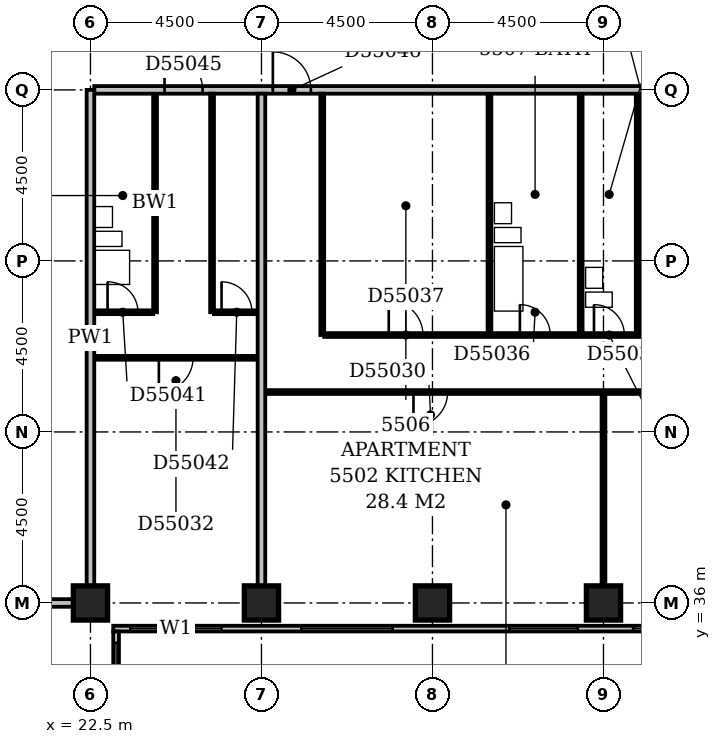
"""IFC4 building model, lengths in metres.
Left out: names, types, materials, properties, quantities, classifications, styles, units other than length and angle.
Written with IfcOpenShell. Run it as: python <this file> out.ifc"""

import sys

from ifc_helpers import new_model, si_unit, direction, frame, frame_2d, origin, origin_2d, place, context, subcontext, project, spatial, rectangle, extrude, element, fill, save


model = new_model("IFC4")
c1 = context("Model", 3, precision=1e-05, world=origin(), true_north=direction((0.0, 1.0)))
c2 = subcontext(c1, "Body", "Model", "MODEL_VIEW")
j1 = project(units=[si_unit("LENGTHUNIT", "METRE"), si_unit("PLANEANGLEUNIT", "RADIAN")], contexts=[c1])
p1 = place(None, origin())
s1 = spatial("IfcSite", under=j1, at=p1, CompositionType="ELEMENT")
p2 = place(p1, origin())
s2 = spatial("IfcBuilding", under=s1, at=p2, CompositionType="ELEMENT")
p3 = place(p2, frame((0.0, 0.0, 215.0)))
s3 = spatial("IfcBuildingStorey", under=s2, at=p3, CompositionType="ELEMENT", Elevation=215.0)
for number, where, z_axis, x_axis in (
    (1, (22.5, 36.0, -0.3), (0.0, 0.0, 1.0), (1.0, 0.0, 0.0)),
    (2, (27.0, 36.0, -0.3), (0.0, 0.0, 1.0), (1.0, 0.0, 0.0)),
    (3, (31.5, 36.0, -0.3), (0.0, 0.0, 1.0), (1.0, 0.0, 0.0)),
    (4, (36.0, 36.0, -0.3), (0.0, 0.0, 1.0), (1.0, 0.0, 0.0)),
):
    element("IfcColumn", number, at=place(p3, frame(where, z_axis=z_axis, x_axis=x_axis)), inside=s3, PredefinedType="COLUMN", context=c2, shape_type="SweptSolid", body=[
        extrude(rectangle(XDim=0.9, YDim=0.9, at=origin_2d()), origin(), (0.0, 0.0, 1.0), 3.6),
    ])
p4 = place(p3, frame((23.175, 17.4, 0.0), z_axis=(0.0, 0.0, 1.0), x_axis=(0.0, 1.0, 0.0)))
e5 = element("IfcWall", 5, at=p4, inside=s3, PredefinedType="STANDARD", context=c2, shape_type="SweptSolid", body=[
    extrude(rectangle(XDim=17.85, YDim=0.15, at=frame_2d((8.925, 0.0))), origin(), (0.0, 0.0, 1.0), 2.7),
])
p5 = place(p4, frame((1.65, 0.0, 0.6)))
e6 = element("IfcOpeningElement", 6, at=p5, cuts=e5, PredefinedType="OPENING", context=c2, shape_type="SweptSolid", body=[
    extrude(rectangle(XDim=2.4, YDim=1.8, at=frame_2d((1.2, 0.9))), frame((0.0, 0.087, 0.0), z_axis=(0.0, -1.0, 0.0), x_axis=(1.0, 0.0, 0.0)), (0.0, 0.0, 1.0), 0.174),
])
p6 = place(p4, frame((6.15, 0.0, 0.6)))
e7 = element("IfcOpeningElement", 7, at=p6, cuts=e5, PredefinedType="OPENING", context=c2, shape_type="SweptSolid", body=[
    extrude(rectangle(XDim=2.4, YDim=1.8, at=frame_2d((1.2, 0.9))), frame((0.0, 0.087, 0.0), z_axis=(0.0, -1.0, 0.0), x_axis=(1.0, 0.0, 0.0)), (0.0, 0.0, 1.0), 0.174),
])
p7 = place(p4, frame((10.288, 0.0, 0.6)))
e8 = element("IfcOpeningElement", 8, at=p7, cuts=e5, PredefinedType="OPENING", context=c2, shape_type="SweptSolid", body=[
    extrude(rectangle(XDim=1.8, YDim=1.8, at=frame_2d((0.9, 0.9))), frame((0.0, 0.087, 0.0), z_axis=(0.0, -1.0, 0.0), x_axis=(1.0, 0.0, 0.0)), (0.0, 0.0, 1.0), 0.174),
])
p8 = place(p4, frame((15.15, 0.0, 0.6)))
e9 = element("IfcOpeningElement", 9, at=p8, cuts=e5, PredefinedType="OPENING", context=c2, shape_type="SweptSolid", body=[
    extrude(rectangle(XDim=2.4, YDim=1.8, at=frame_2d((1.2, 0.9))), frame((0.0, 0.087, 0.0), z_axis=(0.0, -1.0, 0.0), x_axis=(1.0, 0.0, 0.0)), (0.0, 0.0, 1.0), 0.174),
])
p9 = place(p3, frame((23.1, 35.325, 0.0), z_axis=(0.0, 0.0, 1.0), x_axis=(1.0, 0.0, 0.0)))
e10 = element("IfcWall", 10, at=p9, inside=s3, PredefinedType="STANDARD", context=c2, shape_type="SweptSolid", body=[
    extrude(rectangle(XDim=27.15, YDim=0.15, at=frame_2d((13.575, 0.0))), origin(), (0.0, 0.0, 1.0), 2.7),
])
p10 = place(p9, frame((0.45, 0.0, 0.6)))
e11 = element("IfcOpeningElement", 11, at=p10, cuts=e10, PredefinedType="OPENING", context=c2, shape_type="SweptSolid", body=[
    extrude(rectangle(XDim=2.4, YDim=1.8, at=frame_2d((1.2, 0.9))), frame((0.0, 0.087, 0.0), z_axis=(0.0, -1.0, 0.0), x_axis=(1.0, 0.0, 0.0)), (0.0, 0.0, 1.0), 0.174),
])
p11 = place(p9, frame((4.95, 0.0, 0.6)))
e12 = element("IfcOpeningElement", 12, at=p11, cuts=e10, PredefinedType="OPENING", context=c2, shape_type="SweptSolid", body=[
    extrude(rectangle(XDim=2.4, YDim=1.8, at=frame_2d((1.2, 0.9))), frame((0.0, 0.087, 0.0), z_axis=(0.0, -1.0, 0.0), x_axis=(1.0, 0.0, 0.0)), (0.0, 0.0, 1.0), 0.174),
])
p12 = place(p9, frame((10.424, 0.0, 0.6)))
e13 = element("IfcOpeningElement", 13, at=p12, cuts=e10, PredefinedType="OPENING", context=c2, shape_type="SweptSolid", body=[
    extrude(rectangle(XDim=1.8, YDim=1.8, at=frame_2d((0.9, 0.9))), frame((0.0, 0.087, 0.0), z_axis=(0.0, -1.0, 0.0), x_axis=(1.0, 0.0, 0.0)), (0.0, 0.0, 1.0), 0.174),
])
p13 = place(p9, frame((13.68, 0.0, 0.6)))
e14 = element("IfcOpeningElement", 14, at=p13, cuts=e10, PredefinedType="OPENING", context=c2, shape_type="SweptSolid", body=[
    extrude(rectangle(XDim=1.8, YDim=1.8, at=frame_2d((0.9, 0.9))), frame((0.0, 0.087, 0.0), z_axis=(0.0, -1.0, 0.0), x_axis=(1.0, 0.0, 0.0)), (0.0, 0.0, 1.0), 0.174),
])
p14 = place(p9, frame((18.45, 0.0, 0.6)))
e15 = element("IfcOpeningElement", 15, at=p14, cuts=e10, PredefinedType="OPENING", context=c2, shape_type="SweptSolid", body=[
    extrude(rectangle(XDim=2.4, YDim=1.8, at=frame_2d((1.2, 0.9))), frame((0.0, 0.087, 0.0), z_axis=(0.0, -1.0, 0.0), x_axis=(1.0, 0.0, 0.0)), (0.0, 0.0, 1.0), 0.174),
])
p15 = place(p9, frame((22.95, 0.0, 0.6)))
e16 = element("IfcOpeningElement", 16, at=p15, cuts=e10, PredefinedType="OPENING", context=c2, shape_type="SweptSolid", body=[
    extrude(rectangle(XDim=2.4, YDim=1.8, at=frame_2d((1.2, 0.9))), frame((0.0, 0.087, 0.0), z_axis=(0.0, -1.0, 0.0), x_axis=(1.0, 0.0, 0.0)), (0.0, 0.0, 1.0), 0.174),
])
p16 = place(p3, frame((9.1, 36.0, 0.0), z_axis=(0.0, 0.0, 1.0), x_axis=(1.0, 0.0, 0.0)))
e17 = element("IfcWall", 17, at=p16, inside=s3, PredefinedType="PARTITIONING", context=c2, shape_type="SweptSolid", body=[
    extrude(rectangle(XDim=12.95, YDim=0.2, at=frame_2d((6.475, 0.0))), origin(), (0.0, 0.0, 1.0), 3.3),
])
p17 = place(p3, frame((22.5, 36.45, 0.0), z_axis=(0.0, 0.0, 1.0), x_axis=(0.0, 1.0, 0.0)))
e18 = element("IfcWall", 18, at=p17, inside=s3, PredefinedType="PARTITIONING", context=c2, shape_type="SweptSolid", body=[
    extrude(rectangle(XDim=13.05, YDim=0.2, at=frame_2d((6.525, 0.0))), origin(), (0.0, 0.0, 1.0), 3.3),
])
p18 = place(p3, frame((27.0, 36.45, 0.0), z_axis=(0.0, 0.0, 1.0), x_axis=(0.0, 1.0, 0.0)))
e19 = element("IfcWall", 19, at=p18, inside=s3, PredefinedType="PARTITIONING", context=c2, shape_type="SweptSolid", body=[
    extrude(rectangle(XDim=12.95, YDim=0.2, at=frame_2d((6.475, 0.0))), origin(), (0.0, 0.0, 1.0), 2.4),
])
p19 = place(p3, frame((36.0, 36.45, 0.0), z_axis=(0.0, 0.0, 1.0), x_axis=(0.0, 1.0, 0.0)))
e20 = element("IfcWall", 20, at=p19, inside=s3, PredefinedType="PARTITIONING", context=c2, shape_type="SweptSolid", body=[
    extrude(rectangle(XDim=5.05, YDim=0.1, at=frame_2d((2.525, 0.0))), origin(), (0.0, 0.0, 1.0), 2.4),
])
p20 = place(p3, frame((27.1, 41.55, 0.0), z_axis=(0.0, 0.0, 1.0), x_axis=(1.0, 0.0, 0.0)))
e21 = element("IfcWall", 21, at=p20, inside=s3, PredefinedType="PARTITIONING", context=c2, shape_type="SweptSolid", body=[
    extrude(rectangle(XDim=13.3, YDim=0.1, at=frame_2d((6.65, 0.0))), origin(), (0.0, 0.0, 1.0), 3.3),
])
p21 = place(p20, frame((3.9, 0.0, 0.0)))
e22 = element("IfcOpeningElement", 22, at=p21, cuts=e21, PredefinedType="OPENING", context=c2, shape_type="SweptSolid", body=[
    extrude(rectangle(XDim=0.9, YDim=2.1, at=frame_2d((0.45, 1.05))), frame((0.0, 0.062, 0.0), z_axis=(0.0, -1.0, 0.0), x_axis=(1.0, 0.0, 0.0)), (0.0, 0.0, 1.0), 0.124),
])
p22 = place(p20, frame((10.7, 0.0, 0.0)))
e23 = element("IfcOpeningElement", 23, at=p22, cuts=e21, PredefinedType="OPENING", context=c2, shape_type="SweptSolid", body=[
    extrude(rectangle(XDim=0.9, YDim=2.1, at=frame_2d((0.45, 1.05))), frame((0.0, 0.062, 0.0), z_axis=(0.0, -1.0, 0.0), x_axis=(1.0, 0.0, 0.0)), (0.0, 0.0, 1.0), 0.124),
])
p23 = place(p3, frame((22.6, 42.45, 0.0), z_axis=(0.0, 0.0, 1.0), x_axis=(1.0, 0.0, 0.0)))
e24 = element("IfcWall", 24, at=p23, inside=s3, PredefinedType="PARTITIONING", context=c2, shape_type="SweptSolid", body=[
    extrude(rectangle(XDim=4.3, YDim=0.1, at=frame_2d((2.15, 0.0))), origin(), (0.0, 0.0, 1.0), 3.3),
])
p24 = place(p23, frame((1.7, 0.0, 0.0)))
e25 = element("IfcOpeningElement", 25, at=p24, cuts=e24, PredefinedType="OPENING", context=c2, shape_type="SweptSolid", body=[
    extrude(rectangle(XDim=0.9, YDim=2.1, at=frame_2d((0.45, 1.05))), frame((0.0, 0.062, 0.0), z_axis=(0.0, -1.0, 0.0), x_axis=(1.0, 0.0, 0.0)), (0.0, 0.0, 1.0), 0.124),
])
p25 = place(p3, frame((28.6, 43.05, 0.0), z_axis=(0.0, 0.0, 1.0), x_axis=(0.0, 1.0, 0.0)))
e26 = element("IfcWall", 26, at=p25, inside=s3, PredefinedType="PARTITIONING", context=c2, shape_type="SweptSolid", body=[
    extrude(rectangle(XDim=6.35, YDim=0.1, at=frame_2d((3.175, 0.0))), origin(), (0.0, 0.0, 1.0), 3.3),
])
p26 = place(p3, frame((28.65, 43.05, 0.0), z_axis=(0.0, 0.0, 1.0), x_axis=(1.0, 0.0, 0.0)))
e27 = element("IfcWall", 27, at=p26, inside=s3, PredefinedType="PARTITIONING", context=c2, shape_type="SweptSolid", body=[
    extrude(rectangle(XDim=11.75, YDim=0.1, at=frame_2d((5.875, 0.0))), origin(), (0.0, 0.0, 1.0), 3.3),
])
p27 = place(p26, frame((5.15, 0.0, 0.0)))
e28 = element("IfcOpeningElement", 28, at=p27, cuts=e27, PredefinedType="OPENING", context=c2, shape_type="SweptSolid", body=[
    extrude(rectangle(XDim=0.8, YDim=2.1, at=frame_2d((0.4, 1.05))), frame((0.0, 0.062, 0.0), z_axis=(0.0, -1.0, 0.0), x_axis=(1.0, 0.0, 0.0)), (0.0, 0.0, 1.0), 0.124),
])
p28 = place(p26, frame((1.7, 0.0, 0.0)))
e29 = element("IfcOpeningElement", 29, at=p28, cuts=e27, PredefinedType="OPENING", context=c2, shape_type="SweptSolid", body=[
    extrude(rectangle(XDim=0.9, YDim=2.1, at=frame_2d((0.45, 1.05))), frame((0.0, 0.062, 0.0), z_axis=(0.0, -1.0, 0.0), x_axis=(1.0, 0.0, 0.0)), (0.0, 0.0, 1.0), 0.124),
])
p29 = place(p26, frame((8.65, 0.0, 0.0)))
e30 = element("IfcOpeningElement", 30, at=p29, cuts=e27, PredefinedType="OPENING", context=c2, shape_type="SweptSolid", body=[
    extrude(rectangle(XDim=0.8, YDim=2.1, at=frame_2d((0.4, 1.05))), frame((0.0, 0.062, 0.0), z_axis=(0.0, -1.0, 0.0), x_axis=(1.0, 0.0, 0.0)), (0.0, 0.0, 1.0), 0.124),
])
p30 = place(p26, frame((10.45, 0.0, 0.0)))
e31 = element("IfcOpeningElement", 31, at=p30, cuts=e27, PredefinedType="OPENING", context=c2, shape_type="SweptSolid", body=[
    extrude(rectangle(XDim=0.8, YDim=2.1, at=frame_2d((0.4, 1.05))), frame((0.0, 0.062, 0.0), z_axis=(0.0, -1.0, 0.0), x_axis=(1.0, 0.0, 0.0)), (0.0, 0.0, 1.0), 0.124),
])
p31 = place(p26, frame((7.1, 0.0, 0.0)))
e32 = element("IfcOpeningElement", 32, at=p31, cuts=e27, PredefinedType="OPENING", context=c2, shape_type="SweptSolid", body=[
    extrude(rectangle(XDim=0.8, YDim=2.1, at=frame_2d((0.4, 1.05))), frame((0.0, 0.062, 0.0), z_axis=(0.0, -1.0, 0.0), x_axis=(1.0, 0.0, 0.0)), (0.0, 0.0, 1.0), 0.124),
])
p32 = place(p3, frame((33.0, 43.1, 0.0), z_axis=(0.0, 0.0, 1.0), x_axis=(0.0, 1.0, 0.0)))
e33 = element("IfcWall", 33, at=p32, inside=s3, PredefinedType="PLUMBINGWALL", context=c2, shape_type="SweptSolid", body=[
    extrude(rectangle(XDim=6.3, YDim=0.1, at=frame_2d((3.15, 0.0))), origin(), (0.0, 0.0, 1.0), 3.3),
])
p33 = place(p3, frame((35.4, 43.1, 0.0), z_axis=(0.0, 0.0, 1.0), x_axis=(0.0, 1.0, 0.0)))
e34 = element("IfcWall", 34, at=p33, inside=s3, PredefinedType="PLUMBINGWALL", context=c2, shape_type="SweptSolid", body=[
    extrude(rectangle(XDim=6.3, YDim=0.1, at=frame_2d((3.15, 0.0))), origin(), (0.0, 0.0, 1.0), 2.4),
])
p34 = place(p3, frame((36.9, 43.1, 0.0), z_axis=(0.0, 0.0, 1.0), x_axis=(0.0, 1.0, 0.0)))
e35 = element("IfcWall", 35, at=p34, inside=s3, PredefinedType="PLUMBINGWALL", context=c2, shape_type="SweptSolid", body=[
    extrude(rectangle(XDim=6.3, YDim=0.1, at=frame_2d((3.15, 0.0))), origin(), (0.0, 0.0, 1.0), 3.3),
])
p35 = place(p3, frame((22.6, 43.65, 0.0), z_axis=(0.0, 0.0, 1.0), x_axis=(1.0, 0.0, 0.0)))
e36 = element("IfcWall", 36, at=p35, inside=s3, PredefinedType="PARTITIONING", context=c2, shape_type="SweptSolid", body=[
    extrude(rectangle(XDim=1.55, YDim=0.1, at=frame_2d((0.775, 0.0))), origin(), (0.0, 0.0, 1.0), 3.3),
])
p36 = place(p35, frame((0.35, 0.0, 0.0)))
e37 = element("IfcOpeningElement", 37, at=p36, cuts=e36, PredefinedType="OPENING", context=c2, shape_type="SweptSolid", body=[
    extrude(rectangle(XDim=0.8, YDim=2.1, at=frame_2d((0.4, 1.05))), frame((0.0, 0.062, 0.0), z_axis=(0.0, -1.0, 0.0), x_axis=(1.0, 0.0, 0.0)), (0.0, 0.0, 1.0), 0.124),
])
p37 = place(p3, frame((24.2, 43.65, 0.0), z_axis=(0.0, 0.0, 1.0), x_axis=(0.0, 1.0, 0.0)))
e38 = element("IfcWall", 38, at=p37, inside=s3, PredefinedType="PLUMBINGWALL", context=c2, shape_type="SweptSolid", body=[
    extrude(rectangle(XDim=5.75, YDim=0.1, at=frame_2d((2.875, 0.0))), origin(), (0.0, 0.0, 1.0), 3.3),
])
p38 = place(p3, frame((25.7, 43.65, 0.0), z_axis=(0.0, 0.0, 1.0), x_axis=(0.0, 1.0, 0.0)))
e39 = element("IfcWall", 39, at=p38, inside=s3, PredefinedType="PARTITIONING", context=c2, shape_type="SweptSolid", body=[
    extrude(rectangle(XDim=5.75, YDim=0.1, at=frame_2d((2.875, 0.0))), origin(), (0.0, 0.0, 1.0), 3.3),
])
p39 = place(p3, frame((25.75, 43.65, 0.0), z_axis=(0.0, 0.0, 1.0), x_axis=(1.0, 0.0, 0.0)))
e40 = element("IfcWall", 40, at=p39, inside=s3, PredefinedType="PARTITIONING", context=c2, shape_type="SweptSolid", body=[
    extrude(rectangle(XDim=1.15, YDim=0.1, at=frame_2d((0.575, 0.0))), origin(), (0.0, 0.0, 1.0), 3.3),
])
p40 = place(p39, frame((0.2, 0.0, 0.0)))
e41 = element("IfcOpeningElement", 41, at=p40, cuts=e40, PredefinedType="OPENING", context=c2, shape_type="SweptSolid", body=[
    extrude(rectangle(XDim=0.8, YDim=2.1, at=frame_2d((0.4, 1.05))), frame((0.0, 0.062, 0.0), z_axis=(0.0, -1.0, 0.0), x_axis=(1.0, 0.0, 0.0)), (0.0, 0.0, 1.0), 0.124),
])
p41 = place(p3, frame((22.6, 49.5, 0.0), z_axis=(0.0, 0.0, 1.0), x_axis=(1.0, 0.0, 0.0)))
e42 = element("IfcWall", 42, at=p41, inside=s3, PredefinedType="PARTITIONING", context=c2, shape_type="SweptSolid", body=[
    extrude(rectangle(XDim=30.95, YDim=0.2, at=frame_2d((15.475, 0.0))), origin(), (0.0, 0.0, 1.0), 3.3),
])
p42 = place(p41, frame((1.85, 0.0, 0.0)))
e43 = element("IfcOpeningElement", 43, at=p42, cuts=e42, PredefinedType="OPENING", context=c2, shape_type="SweptSolid", body=[
    extrude(rectangle(XDim=1.0, YDim=2.1, at=frame_2d((0.5, 1.05))), frame((0.0, 0.112, 0.0), z_axis=(0.0, -1.0, 0.0), x_axis=(1.0, 0.0, 0.0)), (0.0, 0.0, 1.0), 0.224),
])
p43 = place(p41, frame((4.7, 0.0, 0.0)))
e44 = element("IfcOpeningElement", 44, at=p43, cuts=e42, PredefinedType="OPENING", context=c2, shape_type="SweptSolid", body=[
    extrude(rectangle(XDim=1.0, YDim=2.1, at=frame_2d((0.5, 1.05))), frame((0.0, 0.112, 0.0), z_axis=(0.0, -1.0, 0.0), x_axis=(1.0, 0.0, 0.0)), (0.0, 0.0, 1.0), 0.224),
])
p44 = place(p41, frame((18.2, 0.0, 0.0)))
e45 = element("IfcOpeningElement", 45, at=p44, cuts=e42, PredefinedType="OPENING", context=c2, shape_type="SweptSolid", body=[
    extrude(rectangle(XDim=1.0, YDim=2.1, at=frame_2d((0.5, 1.05))), frame((0.0, 0.112, 0.0), z_axis=(0.0, -1.0, 0.0), x_axis=(1.0, 0.0, 0.0)), (0.0, 0.0, 1.0), 0.224),
])
p45 = place(p41, frame((27.15, 0.0, 0.0)))
e46 = element("IfcOpeningElement", 46, at=p45, cuts=e42, PredefinedType="OPENING", context=c2, shape_type="SweptSolid", body=[
    extrude(rectangle(XDim=1.0, YDim=2.1, at=frame_2d((0.5, 1.05))), frame((0.0, 0.112, 0.0), z_axis=(0.0, -1.0, 0.0), x_axis=(1.0, 0.0, 0.0)), (0.0, 0.0, 1.0), 0.224),
])
p46 = place(p8, origin())
e47 = element("IfcWindow", 47, at=p46, inside=s3, PartitioningType="SINGLE_PANEL", PredefinedType="WINDOW", context=c2, shape_type="SweptSolid", body=[
    extrude(rectangle(XDim=2.4, YDim=1.8, at=frame_2d((1.2, 0.9))), frame((0.0, 0.03, 0.0), z_axis=(0.0, -1.0, 0.0), x_axis=(1.0, 0.0, 0.0)), (0.0, 0.0, 1.0), 0.06),
])
fill(e9, e47)
p47 = place(p10, origin())
e48 = element("IfcWindow", 48, at=p47, inside=s3, PartitioningType="SINGLE_PANEL", PredefinedType="WINDOW", context=c2, shape_type="SweptSolid", body=[
    extrude(rectangle(XDim=2.4, YDim=1.8, at=frame_2d((1.2, 0.9))), frame((0.0, 0.03, 0.0), z_axis=(0.0, -1.0, 0.0), x_axis=(1.0, 0.0, 0.0)), (0.0, 0.0, 1.0), 0.06),
])
fill(e11, e48)
p48 = place(p11, origin())
e49 = element("IfcWindow", 49, at=p48, inside=s3, PartitioningType="SINGLE_PANEL", PredefinedType="WINDOW", context=c2, shape_type="SweptSolid", body=[
    extrude(rectangle(XDim=2.4, YDim=1.8, at=frame_2d((1.2, 0.9))), frame((0.0, 0.03, 0.0), z_axis=(0.0, -1.0, 0.0), x_axis=(1.0, 0.0, 0.0)), (0.0, 0.0, 1.0), 0.06),
])
fill(e12, e49)
p49 = place(p12, origin())
e50 = element("IfcWindow", 50, at=p49, inside=s3, PartitioningType="SINGLE_PANEL", PredefinedType="WINDOW", context=c2, shape_type="SweptSolid", body=[
    extrude(rectangle(XDim=1.8, YDim=1.8, at=frame_2d((0.9, 0.9))), frame((0.0, 0.03, 0.0), z_axis=(0.0, -1.0, 0.0), x_axis=(1.0, 0.0, 0.0)), (0.0, 0.0, 1.0), 0.06),
])
fill(e13, e50)
p50 = place(p13, origin())
e51 = element("IfcWindow", 51, at=p50, inside=s3, PartitioningType="SINGLE_PANEL", PredefinedType="WINDOW", context=c2, shape_type="SweptSolid", body=[
    extrude(rectangle(XDim=1.8, YDim=1.8, at=frame_2d((0.9, 0.9))), frame((0.0, 0.03, 0.0), z_axis=(0.0, -1.0, 0.0), x_axis=(1.0, 0.0, 0.0)), (0.0, 0.0, 1.0), 0.06),
])
fill(e14, e51)
p51 = place(p21, frame((0.9, 0.0, 0.0), z_axis=(0.0, 0.0, 1.0), x_axis=(-1.0, 0.0, 0.0)))
e52 = element("IfcDoor", 52, at=p51, inside=s3, OperationType="SINGLE_SWING_RIGHT", PredefinedType="DOOR", context=c2, shape_type="SweptSolid", body=[
    extrude(rectangle(XDim=0.9, YDim=2.1, at=frame_2d((0.45, 1.05))), frame((0.0, 0.025, 0.0), z_axis=(0.0, -1.0, 0.0), x_axis=(1.0, 0.0, 0.0)), (0.0, 0.0, 1.0), 0.05),
])
fill(e22, e52)
p52 = place(p24, frame((0.9, 0.0, 0.0), z_axis=(0.0, 0.0, 1.0), x_axis=(-1.0, 0.0, 0.0)))
e53 = element("IfcDoor", 53, at=p52, inside=s3, OperationType="SINGLE_SWING_RIGHT", PredefinedType="DOOR", context=c2, shape_type="SweptSolid", body=[
    extrude(rectangle(XDim=0.9, YDim=2.1, at=frame_2d((0.45, 1.05))), frame((0.0, 0.025, 0.0), z_axis=(0.0, -1.0, 0.0), x_axis=(1.0, 0.0, 0.0)), (0.0, 0.0, 1.0), 0.05),
])
fill(e25, e53)
p53 = place(p27, origin())
e54 = element("IfcDoor", 54, at=p53, inside=s3, OperationType="SINGLE_SWING_LEFT", PredefinedType="DOOR", context=c2, shape_type="SweptSolid", body=[
    extrude(rectangle(XDim=0.8, YDim=2.1, at=frame_2d((0.4, 1.05))), frame((0.0, 0.025, 0.0), z_axis=(0.0, -1.0, 0.0), x_axis=(1.0, 0.0, 0.0)), (0.0, 0.0, 1.0), 0.05),
])
fill(e28, e54)
p54 = place(p28, origin())
e55 = element("IfcDoor", 55, at=p54, inside=s3, OperationType="SINGLE_SWING_LEFT", PredefinedType="DOOR", context=c2, shape_type="SweptSolid", body=[
    extrude(rectangle(XDim=0.9, YDim=2.1, at=frame_2d((0.45, 1.05))), frame((0.0, 0.025, 0.0), z_axis=(0.0, -1.0, 0.0), x_axis=(1.0, 0.0, 0.0)), (0.0, 0.0, 1.0), 0.05),
])
fill(e29, e55)
p55 = place(p31, origin())
e56 = element("IfcDoor", 56, at=p55, inside=s3, OperationType="SINGLE_SWING_LEFT", PredefinedType="DOOR", context=c2, shape_type="SweptSolid", body=[
    extrude(rectangle(XDim=0.8, YDim=2.1, at=frame_2d((0.4, 1.05))), frame((0.0, 0.025, 0.0), z_axis=(0.0, -1.0, 0.0), x_axis=(1.0, 0.0, 0.0)), (0.0, 0.0, 1.0), 0.05),
])
fill(e32, e56)
p56 = place(p36, origin())
e57 = element("IfcDoor", 57, at=p56, inside=s3, OperationType="SINGLE_SWING_LEFT", PredefinedType="DOOR", context=c2, shape_type="SweptSolid", body=[
    extrude(rectangle(XDim=0.8, YDim=2.1, at=frame_2d((0.4, 1.05))), frame((0.0, 0.025, 0.0), z_axis=(0.0, -1.0, 0.0), x_axis=(1.0, 0.0, 0.0)), (0.0, 0.0, 1.0), 0.05),
])
fill(e37, e57)
p57 = place(p40, origin())
e58 = element("IfcDoor", 58, at=p57, inside=s3, OperationType="SINGLE_SWING_LEFT", PredefinedType="DOOR", context=c2, shape_type="SweptSolid", body=[
    extrude(rectangle(XDim=0.8, YDim=2.1, at=frame_2d((0.4, 1.05))), frame((0.0, 0.025, 0.0), z_axis=(0.0, -1.0, 0.0), x_axis=(1.0, 0.0, 0.0)), (0.0, 0.0, 1.0), 0.05),
])
fill(e41, e58)
p58 = place(p42, origin())
e59 = element("IfcDoor", 59, at=p58, inside=s3, OperationType="SINGLE_SWING_LEFT", PredefinedType="DOOR", context=c2, shape_type="SweptSolid", body=[
    extrude(rectangle(XDim=1.0, YDim=2.1, at=frame_2d((0.5, 1.05))), frame((0.0, 0.025, 0.0), z_axis=(0.0, -1.0, 0.0), x_axis=(1.0, 0.0, 0.0)), (0.0, 0.0, 1.0), 0.05),
])
fill(e43, e59)
p59 = place(p43, origin())
e60 = element("IfcDoor", 60, at=p59, inside=s3, OperationType="SINGLE_SWING_LEFT", PredefinedType="DOOR", context=c2, shape_type="SweptSolid", body=[
    extrude(rectangle(XDim=1.0, YDim=2.1, at=frame_2d((0.5, 1.05))), frame((0.0, 0.025, 0.0), z_axis=(0.0, -1.0, 0.0), x_axis=(1.0, 0.0, 0.0)), (0.0, 0.0, 1.0), 0.05),
])
fill(e44, e60)
save(model, sys.argv[1])
